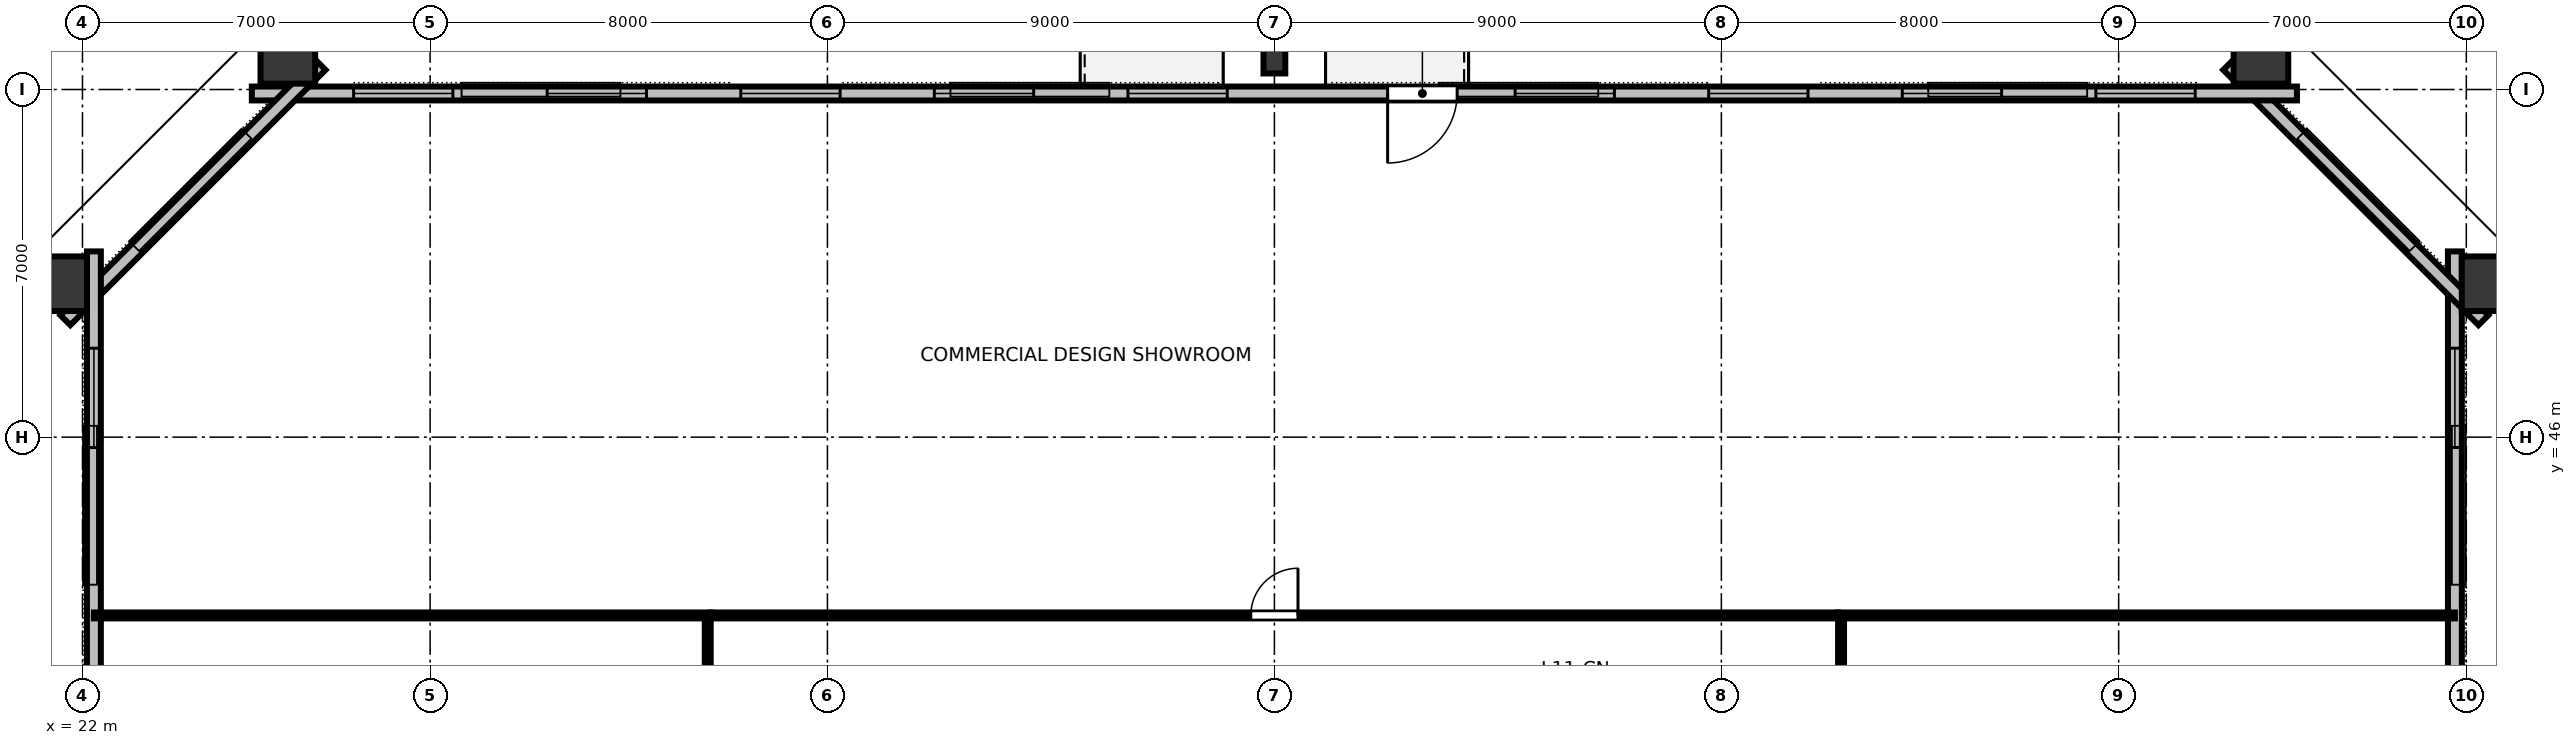
"""IFC4 building model, lengths in metres.
Left out: names, types, materials, properties, quantities, classifications, styles, units other than length and angle.
Written with IfcOpenShell. Run it as: python <this file> out.ifc"""

import sys

from ifc_helpers import new_model, si_unit, direction, frame, frame_2d, origin, origin_2d, place, context, subcontext, project, spatial, rectangle, hollow_rectangle, i_section, extrude, element, fill, save


model = new_model("IFC4")
c1 = context("Model", 3, precision=1e-05, world=origin(), true_north=direction((0.0, 1.0)))
c2 = subcontext(c1, "Body", "Model", "MODEL_VIEW")
j1 = project(units=[si_unit("LENGTHUNIT", "METRE"), si_unit("PLANEANGLEUNIT", "RADIAN")], contexts=[c1])
p1 = place(None, origin())
s1 = spatial("IfcSite", under=j1, at=p1, CompositionType="ELEMENT")
p2 = place(p1, origin())
s2 = spatial("IfcBuilding", under=s1, at=p2, CompositionType="ELEMENT")
p3 = place(p2, frame((0.0, 0.0, 46.0)))
s3 = spatial("IfcBuildingStorey", under=s2, at=p3, CompositionType="ELEMENT", Elevation=46.0)
p4 = place(p3, frame((70.559, 49.089, 0.0), z_axis=(0.109942970926, 0.032204738505, 0.993416024615), x_axis=(-0.953356995981, -0.279259442411, 0.114562655514)))
e1 = element("IfcColumn", 1, at=p4, inside=s3, PredefinedType="COLUMN", context=c2, shape_type="SweptSolid", body=[
    extrude(hollow_rectangle(XDim=1.1, YDim=1.3, WallThickness=0.07, at=origin_2d()), origin(), (0.0, 0.0, 1.0), 3.169),
])
p5 = place(p3, frame((65.865, 53.768, 0.0), z_axis=(0.047892071217, 0.094241724682, 0.994396725077), x_axis=(-0.891490015287, 0.453040343284, 0.0)))
e2 = element("IfcColumn", 2, at=p5, inside=s3, PredefinedType="COLUMN", context=c2, shape_type="SweptSolid", body=[
    extrude(hollow_rectangle(XDim=1.1, YDim=1.3, WallThickness=0.07, at=origin_2d()), origin(), (0.0, 0.0, 1.0), 3.166),
])
p6 = place(p3, frame((46.0, 53.58, 0.0), z_axis=(0.0, 0.094809092628, 0.995495472594), x_axis=(-1.0, 0.0, 0.0)))
e3 = element("IfcColumn", 3, at=p6, inside=s3, PredefinedType="COLUMN", context=c2, shape_type="SweptSolid", body=[
    extrude(i_section(OverallWidth=0.439, OverallDepth=0.514, WebThickness=0.06, FlangeThickness=0.097, FilletRadius=0.025, at=origin_2d()), origin(), (0.0, 0.0, 1.0), 3.162),
])
p7 = place(p3, frame((26.135, 53.768, 0.0), z_axis=(-0.047892071217, 0.094241724682, 0.994396725077), x_axis=(-0.891490015287, -0.453040343284, 0.0)))
e4 = element("IfcColumn", 4, at=p7, inside=s3, PredefinedType="COLUMN", context=c2, shape_type="SweptSolid", body=[
    extrude(hollow_rectangle(XDim=1.1, YDim=1.3, WallThickness=0.07, at=origin_2d()), origin(), (0.0, 0.0, 1.0), 3.166),
])
p8 = place(p3, frame((21.441, 49.089, 0.0), z_axis=(-0.109942970926, 0.032204738505, 0.993416024615), x_axis=(0.953356995981, -0.279259442411, 0.114562655514)))
e5 = element("IfcColumn", 5, at=p8, inside=s3, PredefinedType="COLUMN", context=c2, shape_type="SweptSolid", body=[
    extrude(hollow_rectangle(XDim=1.1, YDim=1.3, WallThickness=0.07, at=origin_2d()), origin(), (0.0, 0.0, 1.0), 3.169),
])
p9 = place(p3, frame((69.77, 14.26, 0.0), z_axis=(0.0, 0.0, 1.0), x_axis=(0.0, 1.0, 0.0)))
e6 = element("IfcWall", 6, at=p9, inside=s3, PredefinedType="STANDARD", context=c2, shape_type="SweptSolid", body=[
    extrude(rectangle(XDim=35.48, YDim=0.28, at=frame_2d((17.74, 0.0))), origin(), (0.0, 0.0, 1.0), 3.15),
])
p10 = place(p9, frame((1.949, 0.0, 0.8)))
e7 = element("IfcOpeningElement", 7, at=p10, cuts=e6, PredefinedType="OPENING", context=c2, shape_type="SweptSolid", body=[
    extrude(rectangle(XDim=2.0, YDim=1.95, at=frame_2d((1.0, 0.975))), frame((0.0, 0.15, 0.0), z_axis=(0.0, -1.0, 0.0), x_axis=(1.0, 0.0, 0.0)), (0.0, 0.0, 1.0), 0.3),
])
p11 = place(p9, frame((9.344, 0.0, 0.8)))
e8 = element("IfcOpeningElement", 8, at=p11, cuts=e6, PredefinedType="OPENING", context=c2, shape_type="SweptSolid", body=[
    extrude(rectangle(XDim=2.0, YDim=1.95, at=frame_2d((1.0, 0.975))), frame((0.0, 0.15, 0.0), z_axis=(0.0, -1.0, 0.0), x_axis=(1.0, 0.0, 0.0)), (0.0, 0.0, 1.0), 0.3),
])
p12 = place(p9, frame((13.042, 0.0, 0.8)))
e9 = element("IfcOpeningElement", 9, at=p12, cuts=e6, PredefinedType="OPENING", context=c2, shape_type="SweptSolid", body=[
    extrude(rectangle(XDim=2.0, YDim=1.95, at=frame_2d((1.0, 0.975))), frame((0.0, 0.15, 0.0), z_axis=(0.0, -1.0, 0.0), x_axis=(1.0, 0.0, 0.0)), (0.0, 0.0, 1.0), 0.3),
])
p13 = place(p9, frame((20.438, 0.0, 0.8)))
e10 = element("IfcOpeningElement", 10, at=p13, cuts=e6, PredefinedType="OPENING", context=c2, shape_type="SweptSolid", body=[
    extrude(rectangle(XDim=2.0, YDim=1.95, at=frame_2d((1.0, 0.975))), frame((0.0, 0.15, 0.0), z_axis=(0.0, -1.0, 0.0), x_axis=(1.0, 0.0, 0.0)), (0.0, 0.0, 1.0), 0.3),
])
p14 = place(p9, frame((24.135, 0.0, 0.8)))
e11 = element("IfcOpeningElement", 11, at=p14, cuts=e6, PredefinedType="OPENING", context=c2, shape_type="SweptSolid", body=[
    extrude(rectangle(XDim=2.0, YDim=1.95, at=frame_2d((1.0, 0.975))), frame((0.0, 0.15, 0.0), z_axis=(0.0, -1.0, 0.0), x_axis=(1.0, 0.0, 0.0)), (0.0, 0.0, 1.0), 0.3),
])
p15 = place(p9, frame((31.531, 0.0, 0.8)))
e12 = element("IfcOpeningElement", 12, at=p15, cuts=e6, PredefinedType="OPENING", context=c2, shape_type="SweptSolid", body=[
    extrude(rectangle(XDim=2.0, YDim=1.95, at=frame_2d((1.0, 0.975))), frame((0.0, 0.15, 0.0), z_axis=(0.0, -1.0, 0.0), x_axis=(1.0, 0.0, 0.0)), (0.0, 0.0, 1.0), 0.3),
])
p16 = place(p3, frame((70.344, 48.354, 0.0), z_axis=(0.0, 0.0, 1.0), x_axis=(-0.707106781187, 0.707106781187, 0.0)))
e13 = element("IfcWall", 13, at=p16, inside=s3, PredefinedType="STANDARD", context=c2, shape_type="SweptSolid", body=[
    extrude(rectangle(XDim=7.268, YDim=0.28, at=frame_2d((3.634, 0.0))), origin(), (0.0, 0.0, 1.0), 3.15),
])
p17 = place(p3, frame((66.59, 52.92, 0.0), z_axis=(0.0, 0.0, 1.0), x_axis=(-1.0, 0.0, 0.0)))
e14 = element("IfcWall", 14, at=p17, inside=s3, PredefinedType="STANDARD", context=c2, shape_type="SweptSolid", body=[
    extrude(rectangle(XDim=41.18, YDim=0.28, at=frame_2d((20.59, 0.0))), origin(), (0.0, 0.0, 1.0), 3.15),
])
p18 = place(p17, frame((16.91, 0.0, 0.0)))
e15 = element("IfcOpeningElement", 15, at=p18, cuts=e14, PredefinedType="OPENING", context=c2, shape_type="SweptSolid", body=[
    extrude(rectangle(XDim=1.4, YDim=2.15, at=frame_2d((0.7, 1.075))), frame((0.0, 0.15, 0.0), z_axis=(0.0, -1.0, 0.0), x_axis=(1.0, 0.0, 0.0)), (0.0, 0.0, 1.0), 0.3),
])
p19 = place(p17, frame((2.049, 0.0, 0.8)))
e16 = element("IfcOpeningElement", 16, at=p19, cuts=e14, PredefinedType="OPENING", context=c2, shape_type="SweptSolid", body=[
    extrude(rectangle(XDim=2.0, YDim=1.95, at=frame_2d((1.0, 0.975))), frame((0.0, 0.15, 0.0), z_axis=(0.0, -1.0, 0.0), x_axis=(1.0, 0.0, 0.0)), (0.0, 0.0, 1.0), 0.3),
])
p20 = place(p17, frame((5.947, 0.0, 0.8)))
e17 = element("IfcOpeningElement", 17, at=p20, cuts=e14, PredefinedType="OPENING", context=c2, shape_type="SweptSolid", body=[
    extrude(rectangle(XDim=2.0, YDim=1.95, at=frame_2d((1.0, 0.975))), frame((0.0, 0.15, 0.0), z_axis=(0.0, -1.0, 0.0), x_axis=(1.0, 0.0, 0.0)), (0.0, 0.0, 1.0), 0.3),
])
p21 = place(p17, frame((9.845, 0.0, 0.8)))
e18 = element("IfcOpeningElement", 18, at=p21, cuts=e14, PredefinedType="OPENING", context=c2, shape_type="SweptSolid", body=[
    extrude(rectangle(XDim=2.0, YDim=1.95, at=frame_2d((1.0, 0.975))), frame((0.0, 0.15, 0.0), z_axis=(0.0, -1.0, 0.0), x_axis=(1.0, 0.0, 0.0)), (0.0, 0.0, 1.0), 0.3),
])
p22 = place(p17, frame((13.743, 0.0, 0.8)))
e19 = element("IfcOpeningElement", 19, at=p22, cuts=e14, PredefinedType="OPENING", context=c2, shape_type="SweptSolid", body=[
    extrude(rectangle(XDim=2.0, YDim=1.95, at=frame_2d((1.0, 0.975))), frame((0.0, 0.15, 0.0), z_axis=(0.0, -1.0, 0.0), x_axis=(1.0, 0.0, 0.0)), (0.0, 0.0, 1.0), 0.3),
])
p23 = place(p17, frame((21.539, 0.0, 0.8)))
e20 = element("IfcOpeningElement", 20, at=p23, cuts=e14, PredefinedType="OPENING", context=c2, shape_type="SweptSolid", body=[
    extrude(rectangle(XDim=2.0, YDim=1.95, at=frame_2d((1.0, 0.975))), frame((0.0, 0.15, 0.0), z_axis=(0.0, -1.0, 0.0), x_axis=(1.0, 0.0, 0.0)), (0.0, 0.0, 1.0), 0.3),
])
p24 = place(p17, frame((25.437, 0.0, 0.8)))
e21 = element("IfcOpeningElement", 21, at=p24, cuts=e14, PredefinedType="OPENING", context=c2, shape_type="SweptSolid", body=[
    extrude(rectangle(XDim=2.0, YDim=1.95, at=frame_2d((1.0, 0.975))), frame((0.0, 0.15, 0.0), z_axis=(0.0, -1.0, 0.0), x_axis=(1.0, 0.0, 0.0)), (0.0, 0.0, 1.0), 0.3),
])
p25 = place(p17, frame((29.335, 0.0, 0.8)))
e22 = element("IfcOpeningElement", 22, at=p25, cuts=e14, PredefinedType="OPENING", context=c2, shape_type="SweptSolid", body=[
    extrude(rectangle(XDim=2.0, YDim=1.95, at=frame_2d((1.0, 0.975))), frame((0.0, 0.15, 0.0), z_axis=(0.0, -1.0, 0.0), x_axis=(1.0, 0.0, 0.0)), (0.0, 0.0, 1.0), 0.3),
])
p26 = place(p17, frame((33.233, 0.0, 0.8)))
e23 = element("IfcOpeningElement", 23, at=p26, cuts=e14, PredefinedType="OPENING", context=c2, shape_type="SweptSolid", body=[
    extrude(rectangle(XDim=2.0, YDim=1.95, at=frame_2d((1.0, 0.975))), frame((0.0, 0.15, 0.0), z_axis=(0.0, -1.0, 0.0), x_axis=(1.0, 0.0, 0.0)), (0.0, 0.0, 1.0), 0.3),
])
p27 = place(p17, frame((37.131, 0.0, 0.8)))
e24 = element("IfcOpeningElement", 24, at=p27, cuts=e14, PredefinedType="OPENING", context=c2, shape_type="SweptSolid", body=[
    extrude(rectangle(XDim=2.0, YDim=1.95, at=frame_2d((1.0, 0.975))), frame((0.0, 0.15, 0.0), z_axis=(0.0, -1.0, 0.0), x_axis=(1.0, 0.0, 0.0)), (0.0, 0.0, 1.0), 0.3),
])
p28 = place(p3, frame((26.795, 53.494, 0.0), z_axis=(0.0, 0.0, 1.0), x_axis=(-0.707106781187, -0.707106781187, 0.0)))
e25 = element("IfcWall", 25, at=p28, inside=s3, PredefinedType="STANDARD", context=c2, shape_type="SweptSolid", body=[
    extrude(rectangle(XDim=7.268, YDim=0.28, at=frame_2d((3.634, 0.0))), origin(), (0.0, 0.0, 1.0), 3.15),
])
p29 = place(p3, frame((22.23, 49.74, 0.0), z_axis=(0.0, 0.0, 1.0), x_axis=(0.0, -1.0, 0.0)))
e26 = element("IfcWall", 26, at=p29, inside=s3, PredefinedType="STANDARD", context=c2, shape_type="SweptSolid", body=[
    extrude(rectangle(XDim=35.48, YDim=0.28, at=frame_2d((17.74, 0.0))), origin(), (0.0, 0.0, 1.0), 3.15),
])
p30 = place(p29, frame((1.949, 0.0, 0.8)))
e27 = element("IfcOpeningElement", 27, at=p30, cuts=e26, PredefinedType="OPENING", context=c2, shape_type="SweptSolid", body=[
    extrude(rectangle(XDim=2.0, YDim=1.95, at=frame_2d((1.0, 0.975))), frame((0.0, 0.15, 0.0), z_axis=(0.0, -1.0, 0.0), x_axis=(1.0, 0.0, 0.0)), (0.0, 0.0, 1.0), 0.3),
])
p31 = place(p29, frame((9.344, 0.0, 0.8)))
e28 = element("IfcOpeningElement", 28, at=p31, cuts=e26, PredefinedType="OPENING", context=c2, shape_type="SweptSolid", body=[
    extrude(rectangle(XDim=2.0, YDim=1.95, at=frame_2d((1.0, 0.975))), frame((0.0, 0.15, 0.0), z_axis=(0.0, -1.0, 0.0), x_axis=(1.0, 0.0, 0.0)), (0.0, 0.0, 1.0), 0.3),
])
p32 = place(p29, frame((24.135, 0.0, 0.8)))
e29 = element("IfcOpeningElement", 29, at=p32, cuts=e26, PredefinedType="OPENING", context=c2, shape_type="SweptSolid", body=[
    extrude(rectangle(XDim=2.0, YDim=1.95, at=frame_2d((1.0, 0.975))), frame((0.0, 0.15, 0.0), z_axis=(0.0, -1.0, 0.0), x_axis=(1.0, 0.0, 0.0)), (0.0, 0.0, 1.0), 0.3),
])
p33 = place(p29, frame((31.531, 0.0, 0.8)))
e30 = element("IfcOpeningElement", 30, at=p33, cuts=e26, PredefinedType="OPENING", context=c2, shape_type="SweptSolid", body=[
    extrude(rectangle(XDim=2.0, YDim=1.95, at=frame_2d((1.0, 0.975))), frame((0.0, 0.15, 0.0), z_axis=(0.0, -1.0, 0.0), x_axis=(1.0, 0.0, 0.0)), (0.0, 0.0, 1.0), 0.3),
])
p34 = place(p3, frame((34.65, 42.41, 0.0), z_axis=(0.0, 0.0, 1.0), x_axis=(1.0, 0.0, 0.0)))
e31 = element("IfcWall", 31, at=p34, inside=s3, PredefinedType="PARTITIONING", context=c2, shape_type="SweptSolid", body=[
    extrude(rectangle(XDim=22.7, YDim=0.12, at=frame_2d((11.35, 0.0))), origin(), (0.0, 0.0, 1.0), 2.43),
])
p35 = place(p34, frame((10.875, 0.0, 0.0)))
e32 = element("IfcOpeningElement", 32, at=p35, cuts=e31, PredefinedType="OPENING", context=c2, shape_type="SweptSolid", body=[
    extrude(rectangle(XDim=0.95, YDim=2.15, at=frame_2d((0.475, 1.075))), frame((0.0, 0.07, 0.0), z_axis=(0.0, -1.0, 0.0), x_axis=(1.0, 0.0, 0.0)), (0.0, 0.0, 1.0), 0.14),
])
p36 = place(p3, frame((34.59, 21.65, 0.0), z_axis=(0.0, 0.0, 1.0), x_axis=(0.0, 1.0, 0.0)))
e33 = element("IfcWall", 33, at=p36, inside=s3, PredefinedType="PARTITIONING", context=c2, shape_type="SweptSolid", body=[
    extrude(rectangle(XDim=20.7, YDim=0.12, at=frame_2d((10.35, 0.0))), origin(), (0.0, 0.0, 1.0), 2.43),
])
p37 = place(p36, frame((3.402, 0.0, 0.0)))
e34 = element("IfcOpeningElement", 34, at=p37, cuts=e33, PredefinedType="OPENING", context=c2, shape_type="SweptSolid", body=[
    extrude(rectangle(XDim=0.95, YDim=2.15, at=frame_2d((0.475, 1.075))), frame((0.0, 0.07, 0.0), z_axis=(0.0, -1.0, 0.0), x_axis=(1.0, 0.0, 0.0)), (0.0, 0.0, 1.0), 0.14),
])
p38 = place(p36, frame((9.912, 0.0, 0.0)))
e35 = element("IfcOpeningElement", 35, at=p38, cuts=e33, PredefinedType="OPENING", context=c2, shape_type="SweptSolid", body=[
    extrude(rectangle(XDim=0.95, YDim=2.15, at=frame_2d((0.475, 1.075))), frame((0.0, 0.07, 0.0), z_axis=(0.0, -1.0, 0.0), x_axis=(1.0, 0.0, 0.0)), (0.0, 0.0, 1.0), 0.14),
])
p39 = place(p36, frame((16.385, 0.0, 0.0)))
e36 = element("IfcOpeningElement", 36, at=p39, cuts=e33, PredefinedType="OPENING", context=c2, shape_type="SweptSolid", body=[
    extrude(rectangle(XDim=0.95, YDim=2.15, at=frame_2d((0.475, 1.075))), frame((0.0, 0.07, 0.0), z_axis=(0.0, -1.0, 0.0), x_axis=(1.0, 0.0, 0.0)), (0.0, 0.0, 1.0), 0.14),
])
p40 = place(p3, frame((57.41, 21.65, 0.0), z_axis=(0.0, 0.0, 1.0), x_axis=(0.0, 1.0, 0.0)))
e37 = element("IfcWall", 37, at=p40, inside=s3, PredefinedType="PARTITIONING", context=c2, shape_type="SweptSolid", body=[
    extrude(rectangle(XDim=20.7, YDim=0.12, at=frame_2d((10.35, 0.0))), origin(), (0.0, 0.0, 1.0), 2.43),
])
p41 = place(p40, frame((9.875, 0.0, 0.0)))
e38 = element("IfcOpeningElement", 38, at=p41, cuts=e37, PredefinedType="OPENING", context=c2, shape_type="SweptSolid", body=[
    extrude(rectangle(XDim=0.95, YDim=2.15, at=frame_2d((0.475, 1.075))), frame((0.0, 0.07, 0.0), z_axis=(0.0, -1.0, 0.0), x_axis=(1.0, 0.0, 0.0)), (0.0, 0.0, 1.0), 0.14),
])
for number, where, z_axis, x_axis in (
    (39, (34.65, 42.41, 0.0), (0.0, 0.0, 1.0), (-1.0, 0.0, 0.0)),
    (40, (57.35, 42.41, 0.0), (0.0, 0.0, 1.0), (1.0, 0.0, 0.0)),
):
    element("IfcWall", number, at=place(p3, frame(where, z_axis=z_axis, x_axis=x_axis)), inside=s3, PredefinedType="PARTITIONING", context=c2, shape_type="SweptSolid", body=[
        extrude(rectangle(XDim=12.42, YDim=0.12, at=frame_2d((6.21, 0.0))), origin(), (0.0, 0.0, 1.0), 2.43),
    ])
p42 = place(p15, origin())
e41 = element("IfcWindow", 41, at=p42, inside=s3, PartitioningType="SINGLE_PANEL", PredefinedType="WINDOW", context=c2, shape_type="SweptSolid", body=[
    extrude(rectangle(XDim=2.0, YDim=1.95, at=frame_2d((1.0, 0.975))), frame((0.0, 0.03, 0.0), z_axis=(0.0, -1.0, 0.0), x_axis=(1.0, 0.0, 0.0)), (0.0, 0.0, 1.0), 0.06),
])
fill(e12, e41)
p43 = place(p18, origin())
e42 = element("IfcDoor", 42, at=p43, inside=s3, OperationType="SINGLE_SWING_RIGHT", PredefinedType="DOOR", context=c2, shape_type="SweptSolid", body=[
    extrude(rectangle(XDim=1.4, YDim=2.15, at=frame_2d((0.7, 1.075))), frame((0.0, 0.025, 0.0), z_axis=(0.0, -1.0, 0.0), x_axis=(1.0, 0.0, 0.0)), (0.0, 0.0, 1.0), 0.05),
])
fill(e15, e42)
p44 = place(p19, origin())
e43 = element("IfcWindow", 43, at=p44, inside=s3, PartitioningType="SINGLE_PANEL", PredefinedType="WINDOW", context=c2, shape_type="SweptSolid", body=[
    extrude(rectangle(XDim=2.0, YDim=1.95, at=frame_2d((1.0, 0.975))), frame((0.0, 0.03, 0.0), z_axis=(0.0, -1.0, 0.0), x_axis=(1.0, 0.0, 0.0)), (0.0, 0.0, 1.0), 0.06),
])
fill(e16, e43)
p45 = place(p20, origin())
e44 = element("IfcWindow", 44, at=p45, inside=s3, PartitioningType="SINGLE_PANEL", PredefinedType="WINDOW", context=c2, shape_type="SweptSolid", body=[
    extrude(rectangle(XDim=2.0, YDim=1.95, at=frame_2d((1.0, 0.975))), frame((0.0, 0.03, 0.0), z_axis=(0.0, -1.0, 0.0), x_axis=(1.0, 0.0, 0.0)), (0.0, 0.0, 1.0), 0.06),
])
fill(e17, e44)
p46 = place(p21, origin())
e45 = element("IfcWindow", 45, at=p46, inside=s3, PartitioningType="SINGLE_PANEL", PredefinedType="WINDOW", context=c2, shape_type="SweptSolid", body=[
    extrude(rectangle(XDim=2.0, YDim=1.95, at=frame_2d((1.0, 0.975))), frame((0.0, 0.03, 0.0), z_axis=(0.0, -1.0, 0.0), x_axis=(1.0, 0.0, 0.0)), (0.0, 0.0, 1.0), 0.06),
])
fill(e18, e45)
p47 = place(p22, origin())
e46 = element("IfcWindow", 46, at=p47, inside=s3, PartitioningType="SINGLE_PANEL", PredefinedType="WINDOW", context=c2, shape_type="SweptSolid", body=[
    extrude(rectangle(XDim=2.0, YDim=1.95, at=frame_2d((1.0, 0.975))), frame((0.0, 0.03, 0.0), z_axis=(0.0, -1.0, 0.0), x_axis=(1.0, 0.0, 0.0)), (0.0, 0.0, 1.0), 0.06),
])
fill(e19, e46)
p48 = place(p23, origin())
e47 = element("IfcWindow", 47, at=p48, inside=s3, PartitioningType="SINGLE_PANEL", PredefinedType="WINDOW", context=c2, shape_type="SweptSolid", body=[
    extrude(rectangle(XDim=2.0, YDim=1.95, at=frame_2d((1.0, 0.975))), frame((0.0, 0.03, 0.0), z_axis=(0.0, -1.0, 0.0), x_axis=(1.0, 0.0, 0.0)), (0.0, 0.0, 1.0), 0.06),
])
fill(e20, e47)
p49 = place(p24, origin())
e48 = element("IfcWindow", 48, at=p49, inside=s3, PartitioningType="SINGLE_PANEL", PredefinedType="WINDOW", context=c2, shape_type="SweptSolid", body=[
    extrude(rectangle(XDim=2.0, YDim=1.95, at=frame_2d((1.0, 0.975))), frame((0.0, 0.03, 0.0), z_axis=(0.0, -1.0, 0.0), x_axis=(1.0, 0.0, 0.0)), (0.0, 0.0, 1.0), 0.06),
])
fill(e21, e48)
p50 = place(p25, origin())
e49 = element("IfcWindow", 49, at=p50, inside=s3, PartitioningType="SINGLE_PANEL", PredefinedType="WINDOW", context=c2, shape_type="SweptSolid", body=[
    extrude(rectangle(XDim=2.0, YDim=1.95, at=frame_2d((1.0, 0.975))), frame((0.0, 0.03, 0.0), z_axis=(0.0, -1.0, 0.0), x_axis=(1.0, 0.0, 0.0)), (0.0, 0.0, 1.0), 0.06),
])
fill(e22, e49)
p51 = place(p26, origin())
e50 = element("IfcWindow", 50, at=p51, inside=s3, PartitioningType="SINGLE_PANEL", PredefinedType="WINDOW", context=c2, shape_type="SweptSolid", body=[
    extrude(rectangle(XDim=2.0, YDim=1.95, at=frame_2d((1.0, 0.975))), frame((0.0, 0.03, 0.0), z_axis=(0.0, -1.0, 0.0), x_axis=(1.0, 0.0, 0.0)), (0.0, 0.0, 1.0), 0.06),
])
fill(e23, e50)
p52 = place(p27, origin())
e51 = element("IfcWindow", 51, at=p52, inside=s3, PartitioningType="SINGLE_PANEL", PredefinedType="WINDOW", context=c2, shape_type="SweptSolid", body=[
    extrude(rectangle(XDim=2.0, YDim=1.95, at=frame_2d((1.0, 0.975))), frame((0.0, 0.03, 0.0), z_axis=(0.0, -1.0, 0.0), x_axis=(1.0, 0.0, 0.0)), (0.0, 0.0, 1.0), 0.06),
])
fill(e24, e51)
p53 = place(p30, origin())
e52 = element("IfcWindow", 52, at=p53, inside=s3, PartitioningType="SINGLE_PANEL", PredefinedType="WINDOW", context=c2, shape_type="SweptSolid", body=[
    extrude(rectangle(XDim=2.0, YDim=1.95, at=frame_2d((1.0, 0.975))), frame((0.0, 0.03, 0.0), z_axis=(0.0, -1.0, 0.0), x_axis=(1.0, 0.0, 0.0)), (0.0, 0.0, 1.0), 0.06),
])
fill(e27, e52)
p54 = place(p35, origin())
e53 = element("IfcDoor", 53, at=p54, inside=s3, OperationType="SINGLE_SWING_RIGHT", PredefinedType="DOOR", context=c2, shape_type="SweptSolid", body=[
    extrude(rectangle(XDim=0.95, YDim=2.15, at=frame_2d((0.475, 1.075))), frame((0.0, 0.025, 0.0), z_axis=(0.0, -1.0, 0.0), x_axis=(1.0, 0.0, 0.0)), (0.0, 0.0, 1.0), 0.05),
])
fill(e32, e53)
save(model, sys.argv[1])
